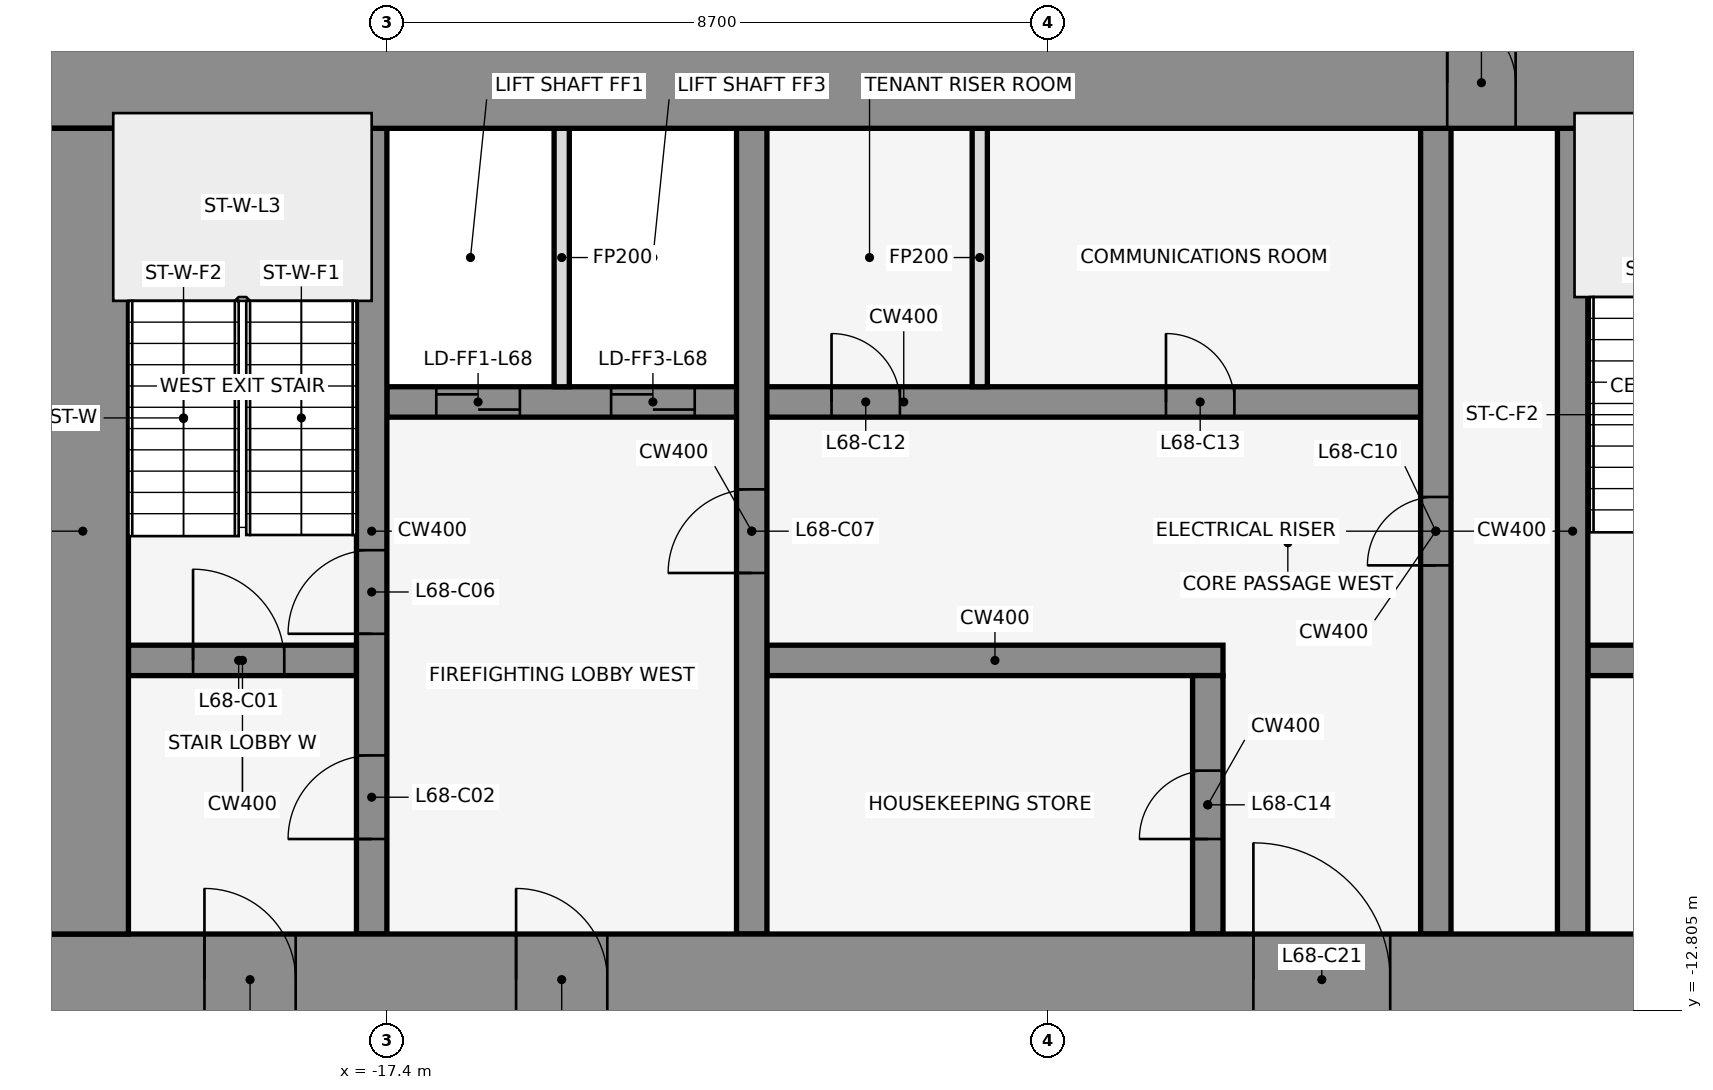
"""IFC4 building model, lengths in metres.
Left out: names, types, materials, properties, quantities, classifications, styles, units other than length and angle.
Written with IfcOpenShell. Run it as: python <this file> out.ifc"""

import sys

from ifc_helpers import new_model, si_unit, direction, frame, frame_2d, origin, place, context, subcontext, project, spatial, rectangle, extrude, element, fill, save


model = new_model("IFC4")
c1 = context("Model", 3, precision=1e-05, world=origin(), true_north=direction((0.0, 1.0)))
c2 = subcontext(c1, "Body", "Model", "MODEL_VIEW")
j1 = project(units=[si_unit("LENGTHUNIT", "METRE"), si_unit("PLANEANGLEUNIT", "RADIAN")], contexts=[c1])
p1 = place(None, origin())
s1 = spatial("IfcSite", under=j1, at=p1, CompositionType="ELEMENT")
p2 = place(p1, origin())
s2 = spatial("IfcBuilding", under=s1, at=p2, CompositionType="ELEMENT")
p3 = place(p2, frame((0.0, 0.0, 302.0)))
s3 = spatial("IfcBuildingStorey", under=s2, at=p3, CompositionType="ELEMENT", Elevation=302.0)
for number, where, z_axis, x_axis in (
    (1, (-0.068, -0.105, 0.0), (0.0, 0.0, 1.0), (-0.84, 0.543, 0.0)),
    (2, (-14.599, 1.08, 0.0), (0.0, 0.0, 1.0), (-0.84, -0.543, 0.0)),
):
    element("IfcWall", number, at=place(p3, frame(where, z_axis=z_axis, x_axis=x_axis)), inside=s3, PredefinedType="STANDARD", context=c2, shape_type="SweptSolid", body=[
        extrude(rectangle(XDim=2.183, YDim=0.25, at=frame_2d((1.091, 0.0))), origin(), (0.0, 0.0, 1.0), 4.35),
    ])
p4 = place(p3, frame((-20.8, -8.2, 0.0), z_axis=(0.0, 0.0, 1.0), x_axis=(1.0, 0.0, 0.0)))
e3 = element("IfcWall", 3, at=p4, inside=s3, PredefinedType="SHEAR", context=c2, shape_type="SweptSolid", body=[
    extrude(rectangle(XDim=3.0, YDim=0.4, at=frame_2d((1.5, 0.0))), origin(), (0.0, 0.0, 1.0), 4.5),
])
p5 = place(p4, frame((0.85, 0.0, 0.0)))
e4 = element("IfcOpeningElement", 4, at=p5, cuts=e3, PredefinedType="OPENING", context=c2, shape_type="SweptSolid", body=[
    extrude(rectangle(XDim=1.2, YDim=2.1, at=frame_2d((0.6, 1.05))), frame((0.0, 0.212, 0.0), z_axis=(0.0, -1.0, 0.0), x_axis=(1.0, 0.0, 0.0)), (0.0, 0.0, 1.0), 0.424),
])
p6 = place(p3, frame((-12.4, -8.2, 0.0), z_axis=(0.0, 0.0, 1.0), x_axis=(1.0, 0.0, 0.0)))
e5 = element("IfcWall", 5, at=p6, inside=s3, PredefinedType="SHEAR", context=c2, shape_type="SweptSolid", body=[
    extrude(rectangle(XDim=6.0, YDim=0.4, at=frame_2d((3.0, 0.0))), origin(), (0.0, 0.0, 1.0), 4.5),
])
p7 = place(p3, frame((-1.6, -8.2, 0.0), z_axis=(0.0, 0.0, 1.0), x_axis=(1.0, 0.0, 0.0)))
e6 = element("IfcWall", 6, at=p7, inside=s3, PredefinedType="SHEAR", context=c2, shape_type="SweptSolid", body=[
    extrude(rectangle(XDim=3.2, YDim=0.4, at=frame_2d((1.6, 0.0))), origin(), (0.0, 0.0, 1.0), 4.5),
])
p8 = place(p7, frame((1.05, 0.0, 0.0)))
e7 = element("IfcOpeningElement", 7, at=p8, cuts=e6, PredefinedType="OPENING", context=c2, shape_type="SweptSolid", body=[
    extrude(rectangle(XDim=1.2, YDim=2.1, at=frame_2d((0.6, 1.05))), frame((0.0, 0.212, 0.0), z_axis=(0.0, -1.0, 0.0), x_axis=(1.0, 0.0, 0.0)), (0.0, 0.0, 1.0), 0.424),
])
p9 = place(p3, frame((-17.4, -4.8, 0.0), z_axis=(0.0, 0.0, 1.0), x_axis=(1.0, 0.0, 0.0)))
e8 = element("IfcWall", 8, at=p9, inside=s3, PredefinedType="SHEAR", context=c2, shape_type="SweptSolid", body=[
    extrude(rectangle(XDim=13.6, YDim=0.4, at=frame_2d((6.8, 0.0))), origin(), (0.0, 0.0, 1.0), 4.5),
])
p10 = place(p9, frame((0.65, 0.0, 0.0)))
e9 = element("IfcOpeningElement", 9, at=p10, cuts=e8, PredefinedType="OPENING", context=c2, shape_type="SweptSolid", body=[
    extrude(rectangle(XDim=1.1, YDim=2.1, at=frame_2d((0.55, 1.05))), frame((0.0, 0.212, 0.0), z_axis=(0.0, -1.0, 0.0), x_axis=(1.0, 0.0, 0.0)), (0.0, 0.0, 1.0), 0.424),
])
p11 = place(p9, frame((2.95, 0.0, 0.0)))
e10 = element("IfcOpeningElement", 10, at=p11, cuts=e8, PredefinedType="OPENING", context=c2, shape_type="SweptSolid", body=[
    extrude(rectangle(XDim=1.1, YDim=2.1, at=frame_2d((0.55, 1.05))), frame((0.0, 0.212, 0.0), z_axis=(0.0, -1.0, 0.0), x_axis=(1.0, 0.0, 0.0)), (0.0, 0.0, 1.0), 0.424),
])
p12 = place(p9, frame((5.85, 0.0, 0.0)))
e11 = element("IfcOpeningElement", 11, at=p12, cuts=e8, PredefinedType="OPENING", context=c2, shape_type="SweptSolid", body=[
    extrude(rectangle(XDim=0.9, YDim=2.1, at=frame_2d((0.45, 1.05))), frame((0.0, 0.212, 0.0), z_axis=(0.0, -1.0, 0.0), x_axis=(1.0, 0.0, 0.0)), (0.0, 0.0, 1.0), 0.424),
])
p13 = place(p9, frame((10.25, 0.0, 0.0)))
e12 = element("IfcOpeningElement", 12, at=p13, cuts=e8, PredefinedType="OPENING", context=c2, shape_type="SweptSolid", body=[
    extrude(rectangle(XDim=0.9, YDim=2.1, at=frame_2d((0.45, 1.05))), frame((0.0, 0.212, 0.0), z_axis=(0.0, -1.0, 0.0), x_axis=(1.0, 0.0, 0.0)), (0.0, 0.0, 1.0), 0.424),
])
p14 = place(p3, frame((-17.6, -11.8, 0.0), z_axis=(0.0, 0.0, 1.0), x_axis=(0.0, 1.0, 0.0)))
e13 = element("IfcWall", 13, at=p14, inside=s3, PredefinedType="SHEAR", context=c2, shape_type="SweptSolid", body=[
    extrude(rectangle(XDim=10.6, YDim=0.4, at=frame_2d((5.3, 0.0))), origin(), (0.0, 0.0, 1.0), 4.5),
])
p15 = place(p14, frame((1.25, 0.0, 0.0)))
e14 = element("IfcOpeningElement", 14, at=p15, cuts=e13, PredefinedType="OPENING", context=c2, shape_type="SweptSolid", body=[
    extrude(rectangle(XDim=1.1, YDim=2.1, at=frame_2d((0.55, 1.05))), frame((0.0, 0.212, 0.0), z_axis=(0.0, -1.0, 0.0), x_axis=(1.0, 0.0, 0.0)), (0.0, 0.0, 1.0), 0.424),
])
p16 = place(p14, frame((3.95, 0.0, 0.0)))
e15 = element("IfcOpeningElement", 15, at=p16, cuts=e13, PredefinedType="OPENING", context=c2, shape_type="SweptSolid", body=[
    extrude(rectangle(XDim=1.1, YDim=2.1, at=frame_2d((0.55, 1.05))), frame((0.0, 0.212, 0.0), z_axis=(0.0, -1.0, 0.0), x_axis=(1.0, 0.0, 0.0)), (0.0, 0.0, 1.0), 0.424),
])
p17 = place(p3, frame((-15.1, -4.6, 0.0), z_axis=(0.0, 0.0, 1.0), x_axis=(0.0, 1.0, 0.0)))
e16 = element("IfcWall", 16, at=p17, inside=s3, PredefinedType="PARTITIONING", context=c2, shape_type="SweptSolid", body=[
    extrude(rectangle(XDim=3.4, YDim=0.2, at=frame_2d((1.7, 0.0))), origin(), (0.0, 0.0, 1.0), 3.418),
])
p18 = place(p3, frame((-12.6, -11.8, 0.0), z_axis=(0.0, 0.0, 1.0), x_axis=(0.0, 1.0, 0.0)))
e17 = element("IfcWall", 17, at=p18, inside=s3, PredefinedType="SHEAR", context=c2, shape_type="SweptSolid", body=[
    extrude(rectangle(XDim=10.6, YDim=0.4, at=frame_2d((5.3, 0.0))), origin(), (0.0, 0.0, 1.0), 4.5),
])
p19 = place(p18, frame((4.75, 0.0, 0.0)))
e18 = element("IfcOpeningElement", 18, at=p19, cuts=e17, PredefinedType="OPENING", context=c2, shape_type="SweptSolid", body=[
    extrude(rectangle(XDim=1.1, YDim=2.1, at=frame_2d((0.55, 1.05))), frame((0.0, 0.212, 0.0), z_axis=(0.0, -1.0, 0.0), x_axis=(1.0, 0.0, 0.0)), (0.0, 0.0, 1.0), 0.424),
])
p20 = place(p3, frame((-9.6, -4.6, 0.0), z_axis=(0.0, 0.0, 1.0), x_axis=(0.0, 1.0, 0.0)))
e19 = element("IfcWall", 19, at=p20, inside=s3, PredefinedType="PARTITIONING", context=c2, shape_type="SweptSolid", body=[
    extrude(rectangle(XDim=3.4, YDim=0.2, at=frame_2d((1.7, 0.0))), origin(), (0.0, 0.0, 1.0), 3.418),
])
p21 = place(p3, frame((-6.6, -11.8, 0.0), z_axis=(0.0, 0.0, 1.0), x_axis=(0.0, 1.0, 0.0)))
e20 = element("IfcWall", 20, at=p21, inside=s3, PredefinedType="SHEAR", context=c2, shape_type="SweptSolid", body=[
    extrude(rectangle(XDim=3.4, YDim=0.4, at=frame_2d((1.7, 0.0))), origin(), (0.0, 0.0, 1.0), 4.5),
])
p22 = place(p21, frame((1.25, 0.0, 0.0)))
e21 = element("IfcOpeningElement", 21, at=p22, cuts=e20, PredefinedType="OPENING", context=c2, shape_type="SweptSolid", body=[
    extrude(rectangle(XDim=0.9, YDim=2.1, at=frame_2d((0.45, 1.05))), frame((0.0, 0.212, 0.0), z_axis=(0.0, -1.0, 0.0), x_axis=(1.0, 0.0, 0.0)), (0.0, 0.0, 1.0), 0.424),
])
p23 = place(p3, frame((-3.6, -11.8, 0.0), z_axis=(0.0, 0.0, 1.0), x_axis=(0.0, 1.0, 0.0)))
e22 = element("IfcWall", 22, at=p23, inside=s3, PredefinedType="SHEAR", context=c2, shape_type="SweptSolid", body=[
    extrude(rectangle(XDim=10.6, YDim=0.4, at=frame_2d((5.3, 0.0))), origin(), (0.0, 0.0, 1.0), 4.5),
])
p24 = place(p23, frame((4.85, 0.0, 0.0)))
e23 = element("IfcOpeningElement", 23, at=p24, cuts=e22, PredefinedType="OPENING", context=c2, shape_type="SweptSolid", body=[
    extrude(rectangle(XDim=0.9, YDim=2.1, at=frame_2d((0.45, 1.05))), frame((0.0, 0.212, 0.0), z_axis=(0.0, -1.0, 0.0), x_axis=(1.0, 0.0, 0.0)), (0.0, 0.0, 1.0), 0.424),
])
p25 = place(p3, frame((-1.8, -11.8, 0.0), z_axis=(0.0, 0.0, 1.0), x_axis=(0.0, 1.0, 0.0)))
e24 = element("IfcWall", 24, at=p25, inside=s3, PredefinedType="SHEAR", context=c2, shape_type="SweptSolid", body=[
    extrude(rectangle(XDim=10.6, YDim=0.4, at=frame_2d((5.3, 0.0))), origin(), (0.0, 0.0, 1.0), 4.5),
])
p26 = place(p3, frame((-22.0, -0.6, 0.0), z_axis=(0.0, 0.0, 1.0), x_axis=(1.0, 0.0, 0.0)))
e25 = element("IfcWall", 25, at=p26, inside=s3, PredefinedType="SHEAR", context=c2, shape_type="SweptSolid", body=[
    extrude(rectangle(XDim=44.0, YDim=1.2, at=frame_2d((22.0, 0.0))), origin(), (0.0, 0.0, 1.0), 4.5),
])
p27 = place(p26, frame((18.55, 0.0, 0.0)))
e26 = element("IfcOpeningElement", 26, at=p27, cuts=e25, PredefinedType="OPENING", context=c2, shape_type="SweptSolid", body=[
    extrude(rectangle(XDim=0.9, YDim=2.1, at=frame_2d((0.45, 1.05))), frame((0.0, 0.612, 0.0), z_axis=(0.0, -1.0, 0.0), x_axis=(1.0, 0.0, 0.0)), (0.0, 0.0, 1.0), 1.224),
])
p28 = place(p26, frame((24.55, 0.0, 0.0)))
e27 = element("IfcOpeningElement", 27, at=p28, cuts=e25, PredefinedType="OPENING", context=c2, shape_type="SweptSolid", body=[
    extrude(rectangle(XDim=0.9, YDim=2.1, at=frame_2d((0.45, 1.05))), frame((0.0, 0.612, 0.0), z_axis=(0.0, -1.0, 0.0), x_axis=(1.0, 0.0, 0.0)), (0.0, 0.0, 1.0), 1.224),
])
p29 = place(p3, frame((-22.0, -12.4, 0.0), z_axis=(0.0, 0.0, 1.0), x_axis=(1.0, 0.0, 0.0)))
e28 = element("IfcWall", 28, at=p29, inside=s3, PredefinedType="SHEAR", context=c2, shape_type="SweptSolid", body=[
    extrude(rectangle(XDim=44.0, YDim=1.2, at=frame_2d((22.0, 0.0))), origin(), (0.0, 0.0, 1.0), 4.5),
])
p30 = place(p29, frame((2.2, 0.0, 0.0)))
e29 = element("IfcOpeningElement", 29, at=p30, cuts=e28, PredefinedType="OPENING", context=c2, shape_type="SweptSolid", body=[
    extrude(rectangle(XDim=1.2, YDim=2.1, at=frame_2d((0.6, 1.05))), frame((0.0, 0.612, 0.0), z_axis=(0.0, -1.0, 0.0), x_axis=(1.0, 0.0, 0.0)), (0.0, 0.0, 1.0), 1.224),
])
p31 = place(p29, frame((21.4, 0.0, 0.0)))
e30 = element("IfcOpeningElement", 30, at=p31, cuts=e28, PredefinedType="OPENING", context=c2, shape_type="SweptSolid", body=[
    extrude(rectangle(XDim=1.2, YDim=2.1, at=frame_2d((0.6, 1.05))), frame((0.0, 0.612, 0.0), z_axis=(0.0, -1.0, 0.0), x_axis=(1.0, 0.0, 0.0)), (0.0, 0.0, 1.0), 1.224),
])
p32 = place(p29, frame((40.6, 0.0, 0.0)))
e31 = element("IfcOpeningElement", 31, at=p32, cuts=e28, PredefinedType="OPENING", context=c2, shape_type="SweptSolid", body=[
    extrude(rectangle(XDim=1.2, YDim=2.1, at=frame_2d((0.6, 1.05))), frame((0.0, 0.612, 0.0), z_axis=(0.0, -1.0, 0.0), x_axis=(1.0, 0.0, 0.0)), (0.0, 0.0, 1.0), 1.224),
])
p33 = place(p29, frame((16.0, 0.0, 0.0)))
e32 = element("IfcOpeningElement", 32, at=p33, cuts=e28, PredefinedType="OPENING", context=c2, shape_type="SweptSolid", body=[
    extrude(rectangle(XDim=1.8, YDim=2.1, at=frame_2d((0.9, 1.05))), frame((0.0, 0.612, 0.0), z_axis=(0.0, -1.0, 0.0), x_axis=(1.0, 0.0, 0.0)), (0.0, 0.0, 1.0), 1.224),
])
p34 = place(p29, frame((6.3, 0.0, 0.0)))
e33 = element("IfcOpeningElement", 33, at=p34, cuts=e28, PredefinedType="OPENING", context=c2, shape_type="SweptSolid", body=[
    extrude(rectangle(XDim=1.2, YDim=2.1, at=frame_2d((0.6, 1.05))), frame((0.0, 0.612, 0.0), z_axis=(0.0, -1.0, 0.0), x_axis=(1.0, 0.0, 0.0)), (0.0, 0.0, 1.0), 1.224),
])
p35 = place(p29, frame((26.2, 0.0, 0.0)))
e34 = element("IfcOpeningElement", 34, at=p35, cuts=e28, PredefinedType="OPENING", context=c2, shape_type="SweptSolid", body=[
    extrude(rectangle(XDim=1.8, YDim=2.1, at=frame_2d((0.9, 1.05))), frame((0.0, 0.612, 0.0), z_axis=(0.0, -1.0, 0.0), x_axis=(1.0, 0.0, 0.0)), (0.0, 0.0, 1.0), 1.224),
])
p36 = place(p29, frame((36.5, 0.0, 0.0)))
e35 = element("IfcOpeningElement", 35, at=p36, cuts=e28, PredefinedType="OPENING", context=c2, shape_type="SweptSolid", body=[
    extrude(rectangle(XDim=1.2, YDim=2.1, at=frame_2d((0.6, 1.05))), frame((0.0, 0.612, 0.0), z_axis=(0.0, -1.0, 0.0), x_axis=(1.0, 0.0, 0.0)), (0.0, 0.0, 1.0), 1.224),
])
p37 = place(p3, frame((-21.4, -11.8, 0.0), z_axis=(0.0, 0.0, 1.0), x_axis=(0.0, 1.0, 0.0)))
e36 = element("IfcWall", 36, at=p37, inside=s3, PredefinedType="SHEAR", context=c2, shape_type="SweptSolid", body=[
    extrude(rectangle(XDim=10.6, YDim=1.2, at=frame_2d((5.3, 0.0))), origin(), (0.0, 0.0, 1.0), 4.5),
])
p38 = place(p5, origin())
e37 = element("IfcDoor", 37, at=p38, inside=s3, OperationType="SINGLE_SWING_LEFT", PredefinedType="DOOR", context=c2, shape_type="SweptSolid", body=[
    extrude(rectangle(XDim=1.2, YDim=2.1, at=frame_2d((0.6, 1.05))), frame((0.0, 0.025, 0.0), z_axis=(0.0, -1.0, 0.0), x_axis=(1.0, 0.0, 0.0)), (0.0, 0.0, 1.0), 0.05),
])
fill(e4, e37)
p39 = place(p15, frame((1.1, 0.0, 0.0), z_axis=(0.0, 0.0, 1.0), x_axis=(-1.0, 0.0, 0.0)))
e38 = element("IfcDoor", 38, at=p39, inside=s3, OperationType="SINGLE_SWING_LEFT", PredefinedType="DOOR", context=c2, shape_type="SweptSolid", body=[
    extrude(rectangle(XDim=1.1, YDim=2.1, at=frame_2d((0.55, 1.05))), frame((0.0, 0.025, 0.0), z_axis=(0.0, -1.0, 0.0), x_axis=(1.0, 0.0, 0.0)), (0.0, 0.0, 1.0), 0.05),
])
fill(e14, e38)
p40 = place(p10, origin())
e39 = element("IfcDoor", 39, at=p40, inside=s3, OperationType="DOUBLE_DOOR_SLIDING", PredefinedType="DOOR", context=c2, shape_type="SweptSolid", body=[
    extrude(rectangle(XDim=1.1, YDim=2.1, at=frame_2d((0.55, 1.05))), frame((0.0, 0.025, 0.0), z_axis=(0.0, -1.0, 0.0), x_axis=(1.0, 0.0, 0.0)), (0.0, 0.0, 1.0), 0.05),
])
fill(e9, e39)
p41 = place(p11, origin())
e40 = element("IfcDoor", 40, at=p41, inside=s3, OperationType="DOUBLE_DOOR_SLIDING", PredefinedType="DOOR", context=c2, shape_type="SweptSolid", body=[
    extrude(rectangle(XDim=1.1, YDim=2.1, at=frame_2d((0.55, 1.05))), frame((0.0, 0.025, 0.0), z_axis=(0.0, -1.0, 0.0), x_axis=(1.0, 0.0, 0.0)), (0.0, 0.0, 1.0), 0.05),
])
fill(e10, e40)
p42 = place(p16, frame((1.1, 0.0, 0.0), z_axis=(0.0, 0.0, 1.0), x_axis=(-1.0, 0.0, 0.0)))
e41 = element("IfcDoor", 41, at=p42, inside=s3, OperationType="SINGLE_SWING_LEFT", PredefinedType="DOOR", context=c2, shape_type="SweptSolid", body=[
    extrude(rectangle(XDim=1.1, YDim=2.1, at=frame_2d((0.55, 1.05))), frame((0.0, 0.025, 0.0), z_axis=(0.0, -1.0, 0.0), x_axis=(1.0, 0.0, 0.0)), (0.0, 0.0, 1.0), 0.05),
])
fill(e15, e41)
p43 = place(p19, origin())
e42 = element("IfcDoor", 42, at=p43, inside=s3, OperationType="SINGLE_SWING_LEFT", PredefinedType="DOOR", context=c2, shape_type="SweptSolid", body=[
    extrude(rectangle(XDim=1.1, YDim=2.1, at=frame_2d((0.55, 1.05))), frame((0.0, 0.025, 0.0), z_axis=(0.0, -1.0, 0.0), x_axis=(1.0, 0.0, 0.0)), (0.0, 0.0, 1.0), 0.05),
])
fill(e18, e42)
p44 = place(p24, frame((0.9, 0.0, 0.0), z_axis=(0.0, 0.0, 1.0), x_axis=(-1.0, 0.0, 0.0)))
e43 = element("IfcDoor", 43, at=p44, inside=s3, OperationType="SINGLE_SWING_LEFT", PredefinedType="DOOR", context=c2, shape_type="SweptSolid", body=[
    extrude(rectangle(XDim=0.9, YDim=2.1, at=frame_2d((0.45, 1.05))), frame((0.0, 0.025, 0.0), z_axis=(0.0, -1.0, 0.0), x_axis=(1.0, 0.0, 0.0)), (0.0, 0.0, 1.0), 0.05),
])
fill(e23, e43)
p45 = place(p12, origin())
e44 = element("IfcDoor", 44, at=p45, inside=s3, OperationType="SINGLE_SWING_RIGHT", PredefinedType="DOOR", context=c2, shape_type="SweptSolid", body=[
    extrude(rectangle(XDim=0.9, YDim=2.1, at=frame_2d((0.45, 1.05))), frame((0.0, 0.025, 0.0), z_axis=(0.0, -1.0, 0.0), x_axis=(1.0, 0.0, 0.0)), (0.0, 0.0, 1.0), 0.05),
])
fill(e11, e44)
p46 = place(p13, origin())
e45 = element("IfcDoor", 45, at=p46, inside=s3, OperationType="SINGLE_SWING_LEFT", PredefinedType="DOOR", context=c2, shape_type="SweptSolid", body=[
    extrude(rectangle(XDim=0.9, YDim=2.1, at=frame_2d((0.45, 1.05))), frame((0.0, 0.025, 0.0), z_axis=(0.0, -1.0, 0.0), x_axis=(1.0, 0.0, 0.0)), (0.0, 0.0, 1.0), 0.05),
])
fill(e12, e45)
p47 = place(p22, origin())
e46 = element("IfcDoor", 46, at=p47, inside=s3, OperationType="SINGLE_SWING_RIGHT", PredefinedType="DOOR", context=c2, shape_type="SweptSolid", body=[
    extrude(rectangle(XDim=0.9, YDim=2.1, at=frame_2d((0.45, 1.05))), frame((0.0, 0.025, 0.0), z_axis=(0.0, -1.0, 0.0), x_axis=(1.0, 0.0, 0.0)), (0.0, 0.0, 1.0), 0.05),
])
fill(e21, e46)
p48 = place(p27, origin())
e47 = element("IfcDoor", 47, at=p48, inside=s3, OperationType="SINGLE_SWING_LEFT", PredefinedType="DOOR", context=c2, shape_type="SweptSolid", body=[
    extrude(rectangle(XDim=0.9, YDim=2.1, at=frame_2d((0.45, 1.05))), frame((0.0, 0.025, 0.0), z_axis=(0.0, -1.0, 0.0), x_axis=(1.0, 0.0, 0.0)), (0.0, 0.0, 1.0), 0.05),
])
fill(e26, e47)
p49 = place(p30, frame((1.2, 0.0, 0.0), z_axis=(0.0, 0.0, 1.0), x_axis=(-1.0, 0.0, 0.0)))
e48 = element("IfcDoor", 48, at=p49, inside=s3, OperationType="SINGLE_SWING_RIGHT", PredefinedType="DOOR", context=c2, shape_type="SweptSolid", body=[
    extrude(rectangle(XDim=1.2, YDim=2.1, at=frame_2d((0.6, 1.05))), frame((0.0, 0.025, 0.0), z_axis=(0.0, -1.0, 0.0), x_axis=(1.0, 0.0, 0.0)), (0.0, 0.0, 1.0), 0.05),
])
fill(e29, e48)
p50 = place(p33, origin())
e49 = element("IfcDoor", 49, at=p50, inside=s3, OperationType="SINGLE_SWING_LEFT", PredefinedType="DOOR", context=c2, shape_type="SweptSolid", body=[
    extrude(rectangle(XDim=1.8, YDim=2.1, at=frame_2d((0.9, 1.05))), frame((0.0, 0.025, 0.0), z_axis=(0.0, -1.0, 0.0), x_axis=(1.0, 0.0, 0.0)), (0.0, 0.0, 1.0), 0.05),
])
fill(e32, e49)
p51 = place(p34, frame((1.2, 0.0, 0.0), z_axis=(0.0, 0.0, 1.0), x_axis=(-1.0, 0.0, 0.0)))
e50 = element("IfcDoor", 50, at=p51, inside=s3, OperationType="SINGLE_SWING_RIGHT", PredefinedType="DOOR", context=c2, shape_type="SweptSolid", body=[
    extrude(rectangle(XDim=1.2, YDim=2.1, at=frame_2d((0.6, 1.05))), frame((0.0, 0.025, 0.0), z_axis=(0.0, -1.0, 0.0), x_axis=(1.0, 0.0, 0.0)), (0.0, 0.0, 1.0), 0.05),
])
fill(e33, e50)
save(model, sys.argv[1])
